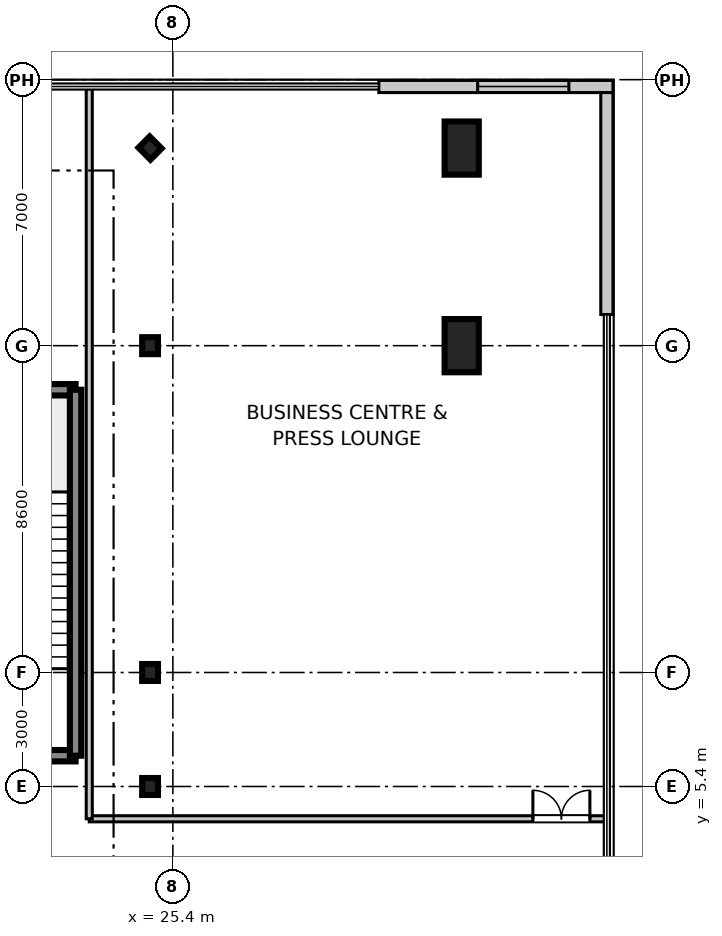
"""IFC4 building model, lengths in metres.
Left out: names, types, materials, properties, quantities, classifications, styles, units other than length and angle.
Written with IfcOpenShell. Run it as: python <this file> out.ifc"""

import sys

from ifc_helpers import new_model, si_unit, direction, frame, frame_2d, origin, origin_2d, place, context, subcontext, project, spatial, rectangle, i_section, extrude, source, transform, mapped, element, fill, save


model = new_model("IFC4")
c1 = context("Model", 3, precision=1e-05, world=origin(), true_north=direction((0.0, 1.0)))
c2 = subcontext(c1, "Body", "Model", "MODEL_VIEW")
j1 = project(units=[si_unit("LENGTHUNIT", "METRE"), si_unit("PLANEANGLEUNIT", "RADIAN")], contexts=[c1])
p1 = place(None, origin())
s1 = spatial("IfcSite", under=j1, at=p1, CompositionType="ELEMENT")
p2 = place(p1, origin())
s2 = spatial("IfcBuilding", under=s1, at=p2, CompositionType="ELEMENT")
p3 = place(p2, frame((0.0, 0.0, 10.8)))
s3 = spatial("IfcBuildingStorey", under=s2, at=p3, CompositionType="ELEMENT", Elevation=10.8)
m1 = source(origin(), c2, "Body", "SweptSolid", [
    extrude(rectangle(XDim=0.9, YDim=1.4, at=origin_2d()), origin(), (0.0, 0.0, 1.0), 5.355),
])
for number, where, z_axis, x_axis in (
    (1, (33.0, 17.0, 0.0), (0.0, 0.0, 1.0), (1.0, 0.0, 0.0)),
    (2, (33.0, 22.2, 0.0), (0.0, 0.0, 1.0), (1.0, 0.0, 0.0)),
):
    element("IfcColumn", number, at=place(p3, frame(where, z_axis=z_axis, x_axis=x_axis)), inside=s3, PredefinedType="PILASTER", context=c2, shape_type="MappedRepresentation", body=[
        mapped(m1, transform((0.0, 0.0, 0.0), scale=1.0)),
    ])
m2 = source(origin(), c2, "Body", "SweptSolid", [
    extrude(i_section(OverallWidth=0.416, OverallDepth=0.446, WebThickness=0.025, FlangeThickness=0.04, at=origin_2d()), origin(), (0.0, 0.0, 1.0), 5.355),
])
for number, where, z_axis, x_axis in (
    (3, (24.8, 5.4, 0.0), (0.0, 0.0, 1.0), (1.0, 0.0, 0.0)),
    (4, (24.8, 8.4, 0.0), (0.0, 0.0, 1.0), (1.0, 0.0, 0.0)),
    (5, (24.8, 17.0, 0.0), (0.0, 0.0, 1.0), (1.0, 0.0, 0.0)),
    (6, (24.8, 22.2, 0.0), (0.0, 0.0, 1.0), (0.707, 0.707, 0.0)),
):
    element("IfcColumn", number, at=place(p3, frame(where, z_axis=z_axis, x_axis=x_axis)), inside=s3, PredefinedType="COLUMN", context=c2, shape_type="MappedRepresentation", body=[
        mapped(m2, transform((0.0, 0.0, 0.0), scale=1.0)),
    ])
m3 = source(origin(), c2, "Body", "SweptSolid", [
    extrude(rectangle(XDim=4.78, YDim=0.3, at=frame_2d((2.39, 0.0))), origin(), (0.0, 0.0, 1.0), 5.06),
])
p4 = place(p3, frame((18.06, 6.21, 0.0), z_axis=(0.0, 0.0, 1.0), x_axis=(1.0, 0.0, 0.0)))
e7 = element("IfcWall", 7, at=p4, inside=s3, PredefinedType="SHEAR", context=c2, shape_type="MappedRepresentation", body=[
    mapped(m3, transform((0.0, 0.0, 0.0), scale=1.0)),
])
p5 = place(p4, frame((1.59, 0.0, 0.0)))
e8 = element("IfcOpeningElement", 8, at=p5, cuts=e7, PredefinedType="OPENING", context=c2, shape_type="SweptSolid", body=[
    extrude(rectangle(XDim=1.6, YDim=2.2, at=frame_2d((0.8, 1.1))), frame((0.0, 0.16, 0.0), z_axis=(0.0, -1.0, 0.0), x_axis=(1.0, 0.0, 0.0)), (0.0, 0.0, 1.0), 0.32),
])
p6 = place(p3, frame((18.06, 15.84, 0.0), z_axis=(0.0, 0.0, 1.0), x_axis=(1.0, 0.0, 0.0)))
e9 = element("IfcWall", 9, at=p6, inside=s3, PredefinedType="SHEAR", context=c2, shape_type="MappedRepresentation", body=[
    mapped(m3, transform((0.0, 0.0, 0.0), scale=1.0)),
])
m4 = source(origin(), c2, "Body", "SweptSolid", [
    extrude(rectangle(XDim=9.63, YDim=0.3, at=frame_2d((4.815, 0.0))), origin(), (0.0, 0.0, 1.0), 5.06),
])
p7 = place(p3, frame((22.84, 6.21, 0.0), z_axis=(0.0, 0.0, 1.0), x_axis=(0.0, 1.0, 0.0)))
e10 = element("IfcWall", 10, at=p7, inside=s3, PredefinedType="SHEAR", context=c2, shape_type="MappedRepresentation", body=[
    mapped(m4, transform((0.0, 0.0, 0.0), scale=1.0)),
])
m5 = source(origin(), c2, "Body", "SweptSolid", [
    extrude(rectangle(XDim=6.16, YDim=0.32, at=frame_2d((3.08, 0.0))), origin(), (0.0, 0.0, 1.0), 5.06),
])
p8 = place(p3, frame((30.82, 23.82, 0.0), z_axis=(0.0, 0.0, 1.0), x_axis=(1.0, 0.0, 0.0)))
e11 = element("IfcWall", 11, at=p8, inside=s3, PredefinedType="STANDARD", context=c2, shape_type="MappedRepresentation", body=[
    mapped(m5, transform((0.0, 0.0, 0.0), scale=1.0)),
])
p9 = place(p8, frame((2.6, 0.0, 0.9)))
e12 = element("IfcOpeningElement", 12, at=p9, cuts=e11, PredefinedType="OPENING", context=c2, shape_type="SweptSolid", body=[
    extrude(rectangle(XDim=2.4, YDim=2.2, at=frame_2d((1.2, 1.1))), frame((0.0, 0.17, 0.0), z_axis=(0.0, -1.0, 0.0), x_axis=(1.0, 0.0, 0.0)), (0.0, 0.0, 1.0), 0.34),
])
m6 = source(origin(), c2, "Body", "SweptSolid", [
    extrude(rectangle(XDim=5.84, YDim=0.32, at=frame_2d((2.92, 0.0))), origin(), (0.0, 0.0, 1.0), 5.06),
])
p10 = place(p3, frame((36.82, 17.82, 0.0), z_axis=(0.0, 0.0, 1.0), x_axis=(0.0, 1.0, 0.0)))
e13 = element("IfcWall", 13, at=p10, inside=s3, PredefinedType="STANDARD", context=c2, shape_type="MappedRepresentation", body=[
    mapped(m6, transform((0.0, 0.0, 0.0), scale=1.0)),
])
m7 = source(origin(), c2, "Body", "SweptSolid", [
    extrude(rectangle(XDim=13.56, YDim=0.16, at=frame_2d((6.78, 0.0))), origin(), (0.0, 0.0, 1.0), 3.4),
])
p11 = place(p3, frame((23.2, 4.55, 0.0), z_axis=(0.0, 0.0, 1.0), x_axis=(1.0, 0.0, 0.0)))
e14 = element("IfcWall", 14, at=p11, inside=s3, PredefinedType="PARTITIONING", context=c2, shape_type="MappedRepresentation", body=[
    mapped(m7, transform((0.0, 0.0, 0.0), scale=1.0)),
])
p12 = place(p11, frame((11.673, 0.0, 0.0)))
e15 = element("IfcOpeningElement", 15, at=p12, cuts=e14, PredefinedType="OPENING", context=c2, shape_type="SweptSolid", body=[
    extrude(rectangle(XDim=1.5, YDim=2.15, at=frame_2d((0.75, 1.075))), frame((0.0, 0.09, 0.0), z_axis=(0.0, -1.0, 0.0), x_axis=(1.0, 0.0, 0.0)), (0.0, 0.0, 1.0), 0.18),
])
m8 = source(origin(), c2, "Body", "SweptSolid", [
    extrude(rectangle(XDim=19.21, YDim=0.16, at=frame_2d((9.605, 0.0))), origin(), (0.0, 0.0, 1.0), 3.4),
])
p13 = place(p3, frame((23.2, 4.55, 0.0), z_axis=(0.0, 0.0, 1.0), x_axis=(0.0, 1.0, 0.0)))
e16 = element("IfcWall", 16, at=p13, inside=s3, PredefinedType="PARTITIONING", context=c2, shape_type="MappedRepresentation", body=[
    mapped(m8, transform((0.0, 0.0, 0.0), scale=1.0)),
])
m9 = source(origin(), c2, "Body", "SweptSolid", [
    extrude(rectangle(XDim=2.4, YDim=2.2, at=frame_2d((1.2, 1.1))), frame((0.0, 0.03, 0.0), z_axis=(0.0, -1.0, 0.0), x_axis=(1.0, 0.0, 0.0)), (0.0, 0.0, 1.0), 0.06),
])
p14 = place(p9, origin())
e17 = element("IfcWindow", 17, at=p14, inside=s3, PartitioningType="SINGLE_PANEL", PredefinedType="WINDOW", context=c2, shape_type="MappedRepresentation", body=[
    mapped(m9, transform((0.0, 0.0, 0.0), scale=1.0)),
])
fill(e12, e17)
m10 = source(origin(), c2, "Body", "SweptSolid", [
    extrude(rectangle(XDim=1.5, YDim=2.15, at=frame_2d((0.75, 1.075))), frame((0.0, 0.025, 0.0), z_axis=(0.0, -1.0, 0.0), x_axis=(1.0, 0.0, 0.0)), (0.0, 0.0, 1.0), 0.05),
])
p15 = place(p12, origin())
e18 = element("IfcDoor", 18, at=p15, inside=s3, OperationType="DOUBLE_DOOR_SINGLE_SWING", PredefinedType="DOOR", context=c2, shape_type="MappedRepresentation", body=[
    mapped(m10, transform((0.0, 0.0, 0.0), scale=1.0)),
])
fill(e15, e18)
save(model, sys.argv[1])
